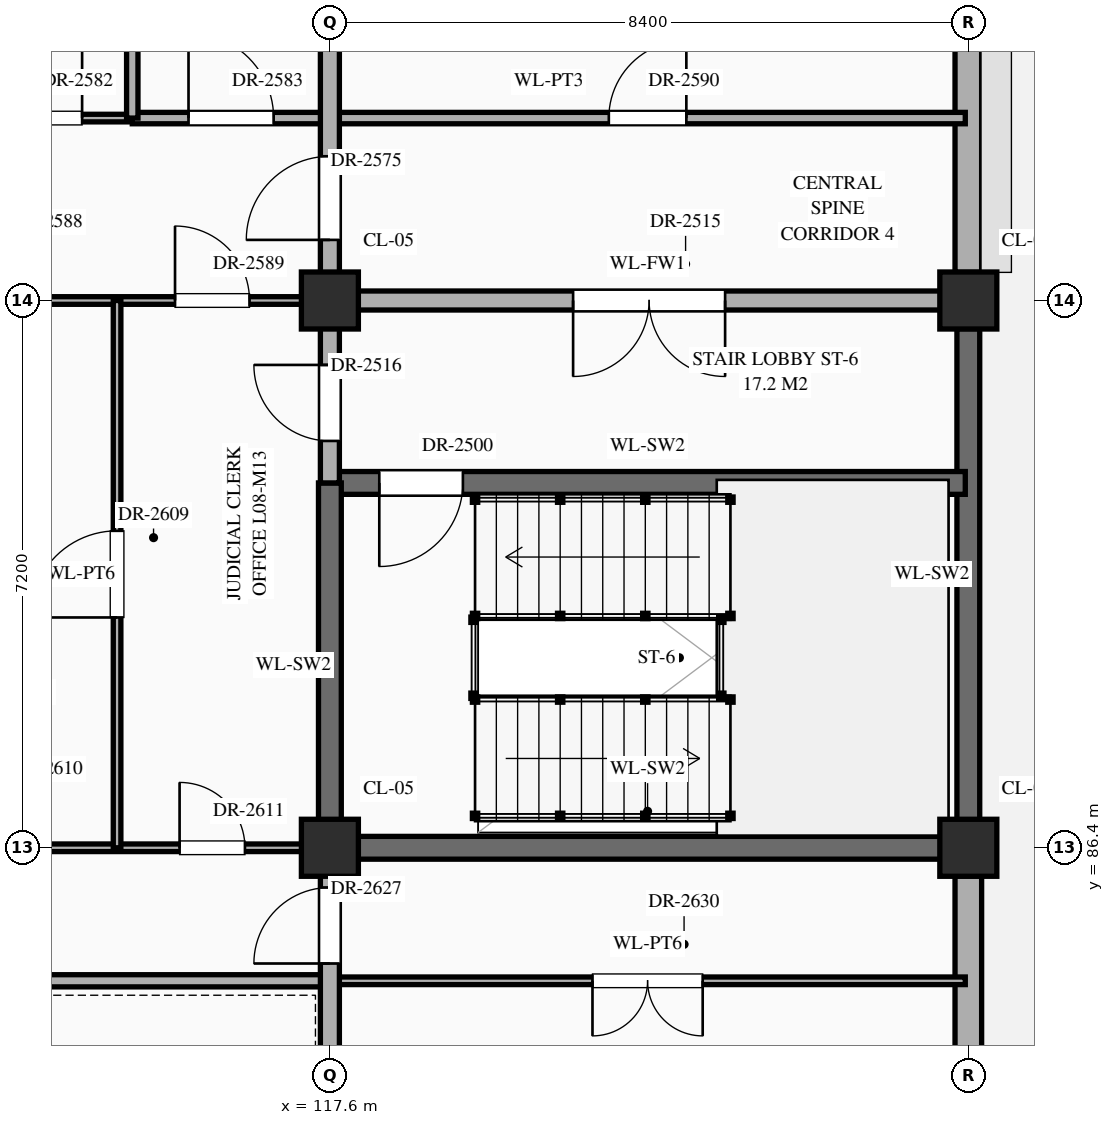
"""IFC4 building model, lengths in metres.
Left out: names, types, materials, properties, quantities, classifications, styles, units other than length and angle.
Written with IfcOpenShell. Run it as: python <this file> out.ifc"""

import sys

from ifc_helpers import new_model, si_unit, direction, frame, frame_2d, origin, origin_2d, place, context, subcontext, project, spatial, rectangle, extrude, element, fill, save


model = new_model("IFC4")
c1 = context("Model", 3, precision=1e-05, world=origin(), true_north=direction((0.0, 1.0)))
c2 = subcontext(c1, "Body", "Model", "MODEL_VIEW")
j1 = project(units=[si_unit("LENGTHUNIT", "METRE"), si_unit("PLANEANGLEUNIT", "RADIAN")], contexts=[c1])
p1 = place(None, origin())
s1 = spatial("IfcSite", under=j1, at=p1, CompositionType="ELEMENT")
p2 = place(p1, origin())
s2 = spatial("IfcBuilding", under=s1, at=p2, CompositionType="ELEMENT")
p3 = place(p2, frame((0.0, 0.0, 35.1)))
s3 = spatial("IfcBuildingStorey", under=s2, at=p3, CompositionType="ELEMENT", Elevation=35.1)
for number, where, z_axis, x_axis in (
    (1, (117.6, 86.4, 0.0), (0.0, 0.0, 1.0), (1.0, 0.0, 0.0)),
    (2, (117.6, 93.6, 0.0), (0.0, 0.0, 1.0), (1.0, 0.0, 0.0)),
    (3, (126.0, 86.4, 0.0), (0.0, 0.0, 1.0), (1.0, 0.0, 0.0)),
    (4, (126.0, 93.6, 0.0), (0.0, 0.0, 1.0), (1.0, 0.0, 0.0)),
):
    element("IfcColumn", number, at=place(p3, frame(where, z_axis=z_axis, x_axis=x_axis)), inside=s3, PredefinedType="COLUMN", context=c2, shape_type="SweptSolid", body=[
        extrude(rectangle(XDim=0.75, YDim=0.75, at=origin_2d()), origin(), (0.0, 0.0, 1.0), 4.2),
    ])
p4 = place(p3, frame((126.0, 79.57, 0.0), z_axis=(0.0, 0.0, 1.0), x_axis=(0.0, 1.0, 0.0)))
e5 = element("IfcWall", 5, at=p4, inside=s3, PredefinedType="STANDARD", context=c2, shape_type="SweptSolid", body=[
    extrude(rectangle(XDim=6.46, YDim=0.35, at=frame_2d((3.23, 0.0))), origin(), (0.0, 0.0, 1.0), 3.3),
])
p5 = place(p4, frame((1.13, 0.0, 0.0)))
e6 = element("IfcOpeningElement", 6, at=p5, cuts=e5, PredefinedType="OPENING", context=c2, shape_type="SweptSolid", body=[
    extrude(rectangle(XDim=1.8, YDim=2.25, at=frame_2d((0.9, 1.125))), frame((0.0, 0.187, 0.0), z_axis=(0.0, -1.0, 0.0), x_axis=(1.0, 0.0, 0.0)), (0.0, 0.0, 1.0), 0.374),
])
p6 = place(p3, frame((126.0, 86.77, 0.0), z_axis=(0.0, 0.0, 1.0), x_axis=(0.0, 1.0, 0.0)))
e7 = element("IfcWall", 7, at=p6, inside=s3, PredefinedType="SHEAR", context=c2, shape_type="SweptSolid", body=[
    extrude(rectangle(XDim=6.46, YDim=0.3, at=frame_2d((3.23, 0.0))), origin(), (0.0, 0.0, 1.0), 3.95),
])
p7 = place(p3, frame((126.0, 93.97, 0.0), z_axis=(0.0, 0.0, 1.0), x_axis=(0.0, 1.0, 0.0)))
e8 = element("IfcWall", 8, at=p7, inside=s3, PredefinedType="STANDARD", context=c2, shape_type="SweptSolid", body=[
    extrude(rectangle(XDim=6.46, YDim=0.35, at=frame_2d((3.23, 0.0))), origin(), (0.0, 0.0, 1.0), 3.3),
])
p8 = place(p7, frame((4.005, 0.0, 0.85)))
e9 = element("IfcOpeningElement", 9, at=p8, cuts=e8, PredefinedType="OPENING", context=c2, shape_type="SweptSolid", body=[
    extrude(rectangle(XDim=1.05, YDim=1.56, at=frame_2d((0.525, 0.78))), frame((0.0, 0.187, 0.0), z_axis=(0.0, -1.0, 0.0), x_axis=(1.0, 0.0, 0.0)), (0.0, 0.0, 1.0), 0.374),
])
p9 = place(p3, frame((100.8, 84.65, 0.0), z_axis=(0.0, 0.0, 1.0), x_axis=(1.0, 0.0, 0.0)))
e10 = element("IfcWall", 10, at=p9, inside=s3, PredefinedType="STANDARD", context=c2, shape_type="SweptSolid", body=[
    extrude(rectangle(XDim=16.8, YDim=0.16, at=frame_2d((8.4, 0.0))), origin(), (0.0, 0.0, 1.0), 3.95),
])
p10 = place(p9, frame((7.55, 0.0, 0.0)))
e11 = element("IfcOpeningElement", 11, at=p10, cuts=e10, PredefinedType="OPENING", context=c2, shape_type="SweptSolid", body=[
    extrude(rectangle(XDim=1.7, YDim=2.45, at=frame_2d((0.85, 1.225))), frame((0.0, 0.092, 0.0), z_axis=(0.0, -1.0, 0.0), x_axis=(1.0, 0.0, 0.0)), (0.0, 0.0, 1.0), 0.184),
])
p11 = place(p3, frame((117.6, 84.65, 0.0), z_axis=(0.0, 0.0, 1.0), x_axis=(1.0, 0.0, 0.0)))
e12 = element("IfcWall", 12, at=p11, inside=s3, PredefinedType="STANDARD", context=c2, shape_type="SweptSolid", body=[
    extrude(rectangle(XDim=8.36, YDim=0.1, at=frame_2d((4.18, 0.0))), origin(), (0.0, 0.0, 1.0), 3.95),
])
p12 = place(p11, frame((3.455, 0.0, 0.0)))
e13 = element("IfcOpeningElement", 13, at=p12, cuts=e12, PredefinedType="OPENING", context=c2, shape_type="SweptSolid", body=[
    extrude(rectangle(XDim=1.45, YDim=2.3, at=frame_2d((0.725, 1.15))), frame((0.0, 0.062, 0.0), z_axis=(0.0, -1.0, 0.0), x_axis=(1.0, 0.0, 0.0)), (0.0, 0.0, 1.0), 0.124),
])
p13 = place(p3, frame((109.2, 86.4, 0.0), z_axis=(0.0, 0.0, 1.0), x_axis=(1.0, 0.0, 0.0)))
e14 = element("IfcWall", 14, at=p13, inside=s3, PredefinedType="STANDARD", context=c2, shape_type="SweptSolid", body=[
    extrude(rectangle(XDim=8.4, YDim=0.1, at=frame_2d((4.2, 0.0))), origin(), (0.0, 0.0, 1.0), 3.1),
])
p14 = place(p13, frame((1.018, 0.0, 0.0)))
e15 = element("IfcOpeningElement", 15, at=p14, cuts=e14, PredefinedType="OPENING", context=c2, shape_type="SweptSolid", body=[
    extrude(rectangle(XDim=1.06, YDim=2.4, at=frame_2d((0.53, 1.2))), frame((0.0, 0.062, 0.0), z_axis=(0.0, -1.0, 0.0), x_axis=(1.0, 0.0, 0.0)), (0.0, 0.0, 1.0), 0.124),
])
p15 = place(p13, frame((3.75, 0.0, 0.0)))
e16 = element("IfcOpeningElement", 16, at=p15, cuts=e14, PredefinedType="OPENING", context=c2, shape_type="SweptSolid", body=[
    extrude(rectangle(XDim=0.9, YDim=2.15, at=frame_2d((0.45, 1.075))), frame((0.0, 0.062, 0.0), z_axis=(0.0, -1.0, 0.0), x_axis=(1.0, 0.0, 0.0)), (0.0, 0.0, 1.0), 0.124),
])
p16 = place(p13, frame((6.423, 0.0, 0.0)))
e17 = element("IfcOpeningElement", 17, at=p16, cuts=e14, PredefinedType="OPENING", context=c2, shape_type="SweptSolid", body=[
    extrude(rectangle(XDim=0.86, YDim=2.1, at=frame_2d((0.43, 1.05))), frame((0.0, 0.062, 0.0), z_axis=(0.0, -1.0, 0.0), x_axis=(1.0, 0.0, 0.0)), (0.0, 0.0, 1.0), 0.124),
])
p17 = place(p3, frame((117.6, 86.4, 0.0), z_axis=(0.0, 0.0, 1.0), x_axis=(1.0, 0.0, 0.0)))
e18 = element("IfcWall", 18, at=p17, inside=s3, PredefinedType="SHEAR", context=c2, shape_type="SweptSolid", body=[
    extrude(rectangle(XDim=8.36, YDim=0.3, at=frame_2d((4.18, 0.0))), origin(), (0.0, 0.0, 1.0), 3.95),
])
p18 = place(p3, frame((117.6, 91.2, 0.0), z_axis=(0.0, 0.0, 1.0), x_axis=(1.0, 0.0, 0.0)))
e19 = element("IfcWall", 19, at=p18, inside=s3, PredefinedType="SHEAR", context=c2, shape_type="SweptSolid", body=[
    extrude(rectangle(XDim=8.36, YDim=0.3, at=frame_2d((4.18, 0.0))), origin(), (0.0, 0.0, 1.0), 3.95),
])
p19 = place(p18, frame((0.65, 0.0, 0.0)))
e20 = element("IfcOpeningElement", 20, at=p19, cuts=e19, PredefinedType="OPENING", context=c2, shape_type="SweptSolid", body=[
    extrude(rectangle(XDim=1.1, YDim=2.2, at=frame_2d((0.55, 1.1))), frame((0.0, 0.162, 0.0), z_axis=(0.0, -1.0, 0.0), x_axis=(1.0, 0.0, 0.0)), (0.0, 0.0, 1.0), 0.324),
])
p20 = place(p3, frame((109.2, 93.6, 0.0), z_axis=(0.0, 0.0, 1.0), x_axis=(1.0, 0.0, 0.0)))
e21 = element("IfcWall", 21, at=p20, inside=s3, PredefinedType="STANDARD", context=c2, shape_type="SweptSolid", body=[
    extrude(rectangle(XDim=8.4, YDim=0.1, at=frame_2d((4.2, 0.0))), origin(), (0.0, 0.0, 1.0), 3.1),
])
p21 = place(p20, frame((0.907, 0.0, 0.0)))
e22 = element("IfcOpeningElement", 22, at=p21, cuts=e21, PredefinedType="OPENING", context=c2, shape_type="SweptSolid", body=[
    extrude(rectangle(XDim=1.28, YDim=2.35, at=frame_2d((0.64, 1.175))), frame((0.0, 0.062, 0.0), z_axis=(0.0, -1.0, 0.0), x_axis=(1.0, 0.0, 0.0)), (0.0, 0.0, 1.0), 0.124),
])
p22 = place(p20, frame((3.73, 0.0, 0.0)))
e23 = element("IfcOpeningElement", 23, at=p22, cuts=e21, PredefinedType="OPENING", context=c2, shape_type="SweptSolid", body=[
    extrude(rectangle(XDim=0.94, YDim=2.3, at=frame_2d((0.47, 1.15))), frame((0.0, 0.062, 0.0), z_axis=(0.0, -1.0, 0.0), x_axis=(1.0, 0.0, 0.0)), (0.0, 0.0, 1.0), 0.124),
])
p23 = place(p20, frame((6.363, 0.0, 0.0)))
e24 = element("IfcOpeningElement", 24, at=p23, cuts=e21, PredefinedType="OPENING", context=c2, shape_type="SweptSolid", body=[
    extrude(rectangle(XDim=0.98, YDim=2.35, at=frame_2d((0.49, 1.175))), frame((0.0, 0.062, 0.0), z_axis=(0.0, -1.0, 0.0), x_axis=(1.0, 0.0, 0.0)), (0.0, 0.0, 1.0), 0.124),
])
p24 = place(p3, frame((117.6, 93.6, 0.0), z_axis=(0.0, 0.0, 1.0), x_axis=(1.0, 0.0, 0.0)))
e25 = element("IfcWall", 25, at=p24, inside=s3, PredefinedType="STANDARD", context=c2, shape_type="SweptSolid", body=[
    extrude(rectangle(XDim=8.36, YDim=0.25, at=frame_2d((4.18, 0.0))), origin(), (0.0, 0.0, 1.0), 3.1),
])
p25 = place(p24, frame((3.2, 0.0, 0.0)))
e26 = element("IfcOpeningElement", 26, at=p25, cuts=e25, PredefinedType="OPENING", context=c2, shape_type="SweptSolid", body=[
    extrude(rectangle(XDim=2.0, YDim=2.4, at=frame_2d((1.0, 1.2))), frame((0.0, 0.137, 0.0), z_axis=(0.0, -1.0, 0.0), x_axis=(1.0, 0.0, 0.0)), (0.0, 0.0, 1.0), 0.274),
])
p26 = place(p3, frame((109.2, 96.0, 0.0), z_axis=(0.0, 0.0, 1.0), x_axis=(1.0, 0.0, 0.0)))
e27 = element("IfcWall", 27, at=p26, inside=s3, PredefinedType="STANDARD", context=c2, shape_type="SweptSolid", body=[
    extrude(rectangle(XDim=5.8, YDim=0.1, at=frame_2d((2.9, 0.0))), origin(), (0.0, 0.0, 1.0), 3.95),
])
p27 = place(p26, frame((1.18, 0.0, 0.0)))
e28 = element("IfcOpeningElement", 28, at=p27, cuts=e27, PredefinedType="OPENING", context=c2, shape_type="SweptSolid", body=[
    extrude(rectangle(XDim=1.04, YDim=2.2, at=frame_2d((0.52, 1.1))), frame((0.0, 0.062, 0.0), z_axis=(0.0, -1.0, 0.0), x_axis=(1.0, 0.0, 0.0)), (0.0, 0.0, 1.0), 0.124),
])
p28 = place(p26, frame((4.06, 0.0, 0.0)))
e29 = element("IfcOpeningElement", 29, at=p28, cuts=e27, PredefinedType="OPENING", context=c2, shape_type="SweptSolid", body=[
    extrude(rectangle(XDim=1.08, YDim=2.25, at=frame_2d((0.54, 1.125))), frame((0.0, 0.062, 0.0), z_axis=(0.0, -1.0, 0.0), x_axis=(1.0, 0.0, 0.0)), (0.0, 0.0, 1.0), 0.124),
])
p29 = place(p3, frame((115.0, 96.0, 0.0), z_axis=(0.0, 0.0, 1.0), x_axis=(1.0, 0.0, 0.0)))
e30 = element("IfcWall", 30, at=p29, inside=s3, PredefinedType="STANDARD", context=c2, shape_type="SweptSolid", body=[
    extrude(rectangle(XDim=10.96, YDim=0.15, at=frame_2d((5.48, 0.0))), origin(), (0.0, 0.0, 1.0), 3.95),
])
p30 = place(p29, frame((0.74, 0.0, 0.0)))
e31 = element("IfcOpeningElement", 31, at=p30, cuts=e30, PredefinedType="OPENING", context=c2, shape_type="SweptSolid", body=[
    extrude(rectangle(XDim=1.12, YDim=2.25, at=frame_2d((0.56, 1.125))), frame((0.0, 0.087, 0.0), z_axis=(0.0, -1.0, 0.0), x_axis=(1.0, 0.0, 0.0)), (0.0, 0.0, 1.0), 0.174),
])
p31 = place(p29, frame((6.27, 0.0, 0.0)))
e32 = element("IfcOpeningElement", 32, at=p31, cuts=e30, PredefinedType="OPENING", context=c2, shape_type="SweptSolid", body=[
    extrude(rectangle(XDim=1.02, YDim=2.4, at=frame_2d((0.51, 1.2))), frame((0.0, 0.087, 0.0), z_axis=(0.0, -1.0, 0.0), x_axis=(1.0, 0.0, 0.0)), (0.0, 0.0, 1.0), 0.174),
])
p32 = place(p3, frame((114.8, 86.4, 0.0), z_axis=(0.0, 0.0, 1.0), x_axis=(0.0, 1.0, 0.0)))
e33 = element("IfcWall", 33, at=p32, inside=s3, PredefinedType="STANDARD", context=c2, shape_type="SweptSolid", body=[
    extrude(rectangle(XDim=7.2, YDim=0.1, at=frame_2d((3.6, 0.0))), origin(), (0.0, 0.0, 1.0), 3.95),
])
p33 = place(p32, frame((3.03, 0.0, 0.0)))
e34 = element("IfcOpeningElement", 34, at=p33, cuts=e33, PredefinedType="OPENING", context=c2, shape_type="SweptSolid", body=[
    extrude(rectangle(XDim=1.14, YDim=2.4, at=frame_2d((0.57, 1.2))), frame((0.0, 0.062, 0.0), z_axis=(0.0, -1.0, 0.0), x_axis=(1.0, 0.0, 0.0)), (0.0, 0.0, 1.0), 0.124),
])
p34 = place(p3, frame((115.0, 96.0, 0.0), z_axis=(0.0, 0.0, 1.0), x_axis=(0.0, 1.0, 0.0)))
e35 = element("IfcWall", 35, at=p34, inside=s3, PredefinedType="STANDARD", context=c2, shape_type="SweptSolid", body=[
    extrude(rectangle(XDim=4.8, YDim=0.15, at=frame_2d((2.4, 0.0))), origin(), (0.0, 0.0, 1.0), 3.95),
])
p35 = place(p34, frame((1.92, 0.0, 0.0)))
e36 = element("IfcOpeningElement", 36, at=p35, cuts=e35, PredefinedType="OPENING", context=c2, shape_type="SweptSolid", body=[
    extrude(rectangle(XDim=0.96, YDim=2.2, at=frame_2d((0.48, 1.1))), frame((0.0, 0.087, 0.0), z_axis=(0.0, -1.0, 0.0), x_axis=(1.0, 0.0, 0.0)), (0.0, 0.0, 1.0), 0.174),
])
p36 = place(p3, frame((117.6, 79.24, 0.0), z_axis=(0.0, 0.0, 1.0), x_axis=(0.0, 1.0, 0.0)))
e37 = element("IfcWall", 37, at=p36, inside=s3, PredefinedType="STANDARD", context=c2, shape_type="SweptSolid", body=[
    extrude(rectangle(XDim=7.16, YDim=0.25, at=frame_2d((3.58, 0.0))), origin(), (0.0, 0.0, 1.0), 3.2),
])
p37 = place(p36, frame((5.637, 0.0, 0.0)))
e38 = element("IfcOpeningElement", 38, at=p37, cuts=e37, PredefinedType="OPENING", context=c2, shape_type="SweptSolid", body=[
    extrude(rectangle(XDim=1.0, YDim=2.2, at=frame_2d((0.5, 1.1))), frame((0.0, 0.137, 0.0), z_axis=(0.0, -1.0, 0.0), x_axis=(1.0, 0.0, 0.0)), (0.0, 0.0, 1.0), 0.274),
])
p38 = place(p36, frame((2.032, 0.0, 0.0)))
e39 = element("IfcOpeningElement", 39, at=p38, cuts=e37, PredefinedType="OPENING", context=c2, shape_type="SweptSolid", body=[
    extrude(rectangle(XDim=1.6, YDim=2.3, at=frame_2d((0.8, 1.15))), frame((0.0, 0.137, 0.0), z_axis=(0.0, -1.0, 0.0), x_axis=(1.0, 0.0, 0.0)), (0.0, 0.0, 1.0), 0.274),
])
p39 = place(p3, frame((117.6, 86.4, 0.0), z_axis=(0.0, 0.0, 1.0), x_axis=(0.0, 1.0, 0.0)))
e40 = element("IfcWall", 40, at=p39, inside=s3, PredefinedType="SHEAR", context=c2, shape_type="SweptSolid", body=[
    extrude(rectangle(XDim=4.8, YDim=0.3, at=frame_2d((2.4, 0.0))), origin(), (0.0, 0.0, 1.0), 3.95),
])
p40 = place(p3, frame((117.6, 91.2, 0.0), z_axis=(0.0, 0.0, 1.0), x_axis=(0.0, 1.0, 0.0)))
e41 = element("IfcWall", 41, at=p40, inside=s3, PredefinedType="STANDARD", context=c2, shape_type="SweptSolid", body=[
    extrude(rectangle(XDim=13.2, YDim=0.25, at=frame_2d((6.6, 0.0))), origin(), (0.0, 0.0, 1.0), 3.2),
])
p41 = place(p40, frame((0.552, 0.0, 0.0)))
e42 = element("IfcOpeningElement", 42, at=p41, cuts=e41, PredefinedType="OPENING", context=c2, shape_type="SweptSolid", body=[
    extrude(rectangle(XDim=1.0, YDim=2.2, at=frame_2d((0.5, 1.1))), frame((0.0, 0.137, 0.0), z_axis=(0.0, -1.0, 0.0), x_axis=(1.0, 0.0, 0.0)), (0.0, 0.0, 1.0), 0.274),
])
p42 = place(p40, frame((10.397, 0.0, 0.0)))
e43 = element("IfcOpeningElement", 43, at=p42, cuts=e41, PredefinedType="OPENING", context=c2, shape_type="SweptSolid", body=[
    extrude(rectangle(XDim=1.1, YDim=2.2, at=frame_2d((0.55, 1.1))), frame((0.0, 0.137, 0.0), z_axis=(0.0, -1.0, 0.0), x_axis=(1.0, 0.0, 0.0)), (0.0, 0.0, 1.0), 0.274),
])
p43 = place(p40, frame((3.198, 0.0, 0.0)))
e44 = element("IfcOpeningElement", 44, at=p43, cuts=e41, PredefinedType="OPENING", context=c2, shape_type="SweptSolid", body=[
    extrude(rectangle(XDim=1.1, YDim=2.2, at=frame_2d((0.55, 1.1))), frame((0.0, 0.137, 0.0), z_axis=(0.0, -1.0, 0.0), x_axis=(1.0, 0.0, 0.0)), (0.0, 0.0, 1.0), 0.274),
])
p44 = place(p19, frame((1.1, 0.0, 0.0), z_axis=(0.0, 0.0, 1.0), x_axis=(-1.0, 0.0, 0.0)))
e45 = element("IfcDoor", 45, at=p44, inside=s3, OperationType="SINGLE_SWING_RIGHT", PredefinedType="DOOR", context=c2, shape_type="SweptSolid", body=[
    extrude(rectangle(XDim=1.1, YDim=2.2, at=frame_2d((0.55, 1.1))), frame((0.0, 0.025, 0.0), z_axis=(0.0, -1.0, 0.0), x_axis=(1.0, 0.0, 0.0)), (0.0, 0.0, 1.0), 0.05),
])
fill(e20, e45)
p45 = place(p25, frame((2.0, 0.0, 0.0), z_axis=(0.0, 0.0, 1.0), x_axis=(-1.0, 0.0, 0.0)))
e46 = element("IfcDoor", 46, at=p45, inside=s3, OperationType="DOUBLE_DOOR_SINGLE_SWING", PredefinedType="DOOR", context=c2, shape_type="SweptSolid", body=[
    extrude(rectangle(XDim=2.0, YDim=2.4, at=frame_2d((1.0, 1.2))), frame((0.0, 0.025, 0.0), z_axis=(0.0, -1.0, 0.0), x_axis=(1.0, 0.0, 0.0)), (0.0, 0.0, 1.0), 0.05),
])
fill(e26, e46)
p46 = place(p41, origin())
e47 = element("IfcDoor", 47, at=p46, inside=s3, OperationType="SINGLE_SWING_RIGHT", PredefinedType="DOOR", context=c2, shape_type="SweptSolid", body=[
    extrude(rectangle(XDim=1.0, YDim=2.2, at=frame_2d((0.5, 1.1))), frame((0.0, 0.025, 0.0), z_axis=(0.0, -1.0, 0.0), x_axis=(1.0, 0.0, 0.0)), (0.0, 0.0, 1.0), 0.05),
])
fill(e42, e47)
p47 = place(p43, origin())
e48 = element("IfcDoor", 48, at=p47, inside=s3, OperationType="SINGLE_SWING_LEFT", PredefinedType="DOOR", context=c2, shape_type="SweptSolid", body=[
    extrude(rectangle(XDim=1.1, YDim=2.2, at=frame_2d((0.55, 1.1))), frame((0.0, 0.025, 0.0), z_axis=(0.0, -1.0, 0.0), x_axis=(1.0, 0.0, 0.0)), (0.0, 0.0, 1.0), 0.05),
])
fill(e44, e48)
p48 = place(p28, origin())
e49 = element("IfcDoor", 49, at=p48, inside=s3, OperationType="SINGLE_SWING_RIGHT", PredefinedType="DOOR", context=c2, shape_type="SweptSolid", body=[
    extrude(rectangle(XDim=1.08, YDim=2.25, at=frame_2d((0.54, 1.125))), frame((0.0, 0.025, 0.0), z_axis=(0.0, -1.0, 0.0), x_axis=(1.0, 0.0, 0.0)), (0.0, 0.0, 1.0), 0.05),
])
fill(e29, e49)
p49 = place(p30, origin())
e50 = element("IfcDoor", 50, at=p49, inside=s3, OperationType="SINGLE_SWING_LEFT", PredefinedType="DOOR", context=c2, shape_type="SweptSolid", body=[
    extrude(rectangle(XDim=1.12, YDim=2.25, at=frame_2d((0.56, 1.125))), frame((0.0, 0.025, 0.0), z_axis=(0.0, -1.0, 0.0), x_axis=(1.0, 0.0, 0.0)), (0.0, 0.0, 1.0), 0.05),
])
fill(e31, e50)
p50 = place(p23, origin())
e51 = element("IfcDoor", 51, at=p50, inside=s3, OperationType="SINGLE_SWING_LEFT", PredefinedType="DOOR", context=c2, shape_type="SweptSolid", body=[
    extrude(rectangle(XDim=0.98, YDim=2.35, at=frame_2d((0.49, 1.175))), frame((0.0, 0.025, 0.0), z_axis=(0.0, -1.0, 0.0), x_axis=(1.0, 0.0, 0.0)), (0.0, 0.0, 1.0), 0.05),
])
fill(e24, e51)
p51 = place(p31, origin())
e52 = element("IfcDoor", 52, at=p51, inside=s3, OperationType="SINGLE_SWING_RIGHT", PredefinedType="DOOR", context=c2, shape_type="SweptSolid", body=[
    extrude(rectangle(XDim=1.02, YDim=2.4, at=frame_2d((0.51, 1.2))), frame((0.0, 0.025, 0.0), z_axis=(0.0, -1.0, 0.0), x_axis=(1.0, 0.0, 0.0)), (0.0, 0.0, 1.0), 0.05),
])
fill(e32, e52)
p52 = place(p33, origin())
e53 = element("IfcDoor", 53, at=p52, inside=s3, OperationType="SINGLE_SWING_LEFT", PredefinedType="DOOR", context=c2, shape_type="SweptSolid", body=[
    extrude(rectangle(XDim=1.14, YDim=2.4, at=frame_2d((0.57, 1.2))), frame((0.0, 0.025, 0.0), z_axis=(0.0, -1.0, 0.0), x_axis=(1.0, 0.0, 0.0)), (0.0, 0.0, 1.0), 0.05),
])
fill(e34, e53)
p53 = place(p16, origin())
e54 = element("IfcDoor", 54, at=p53, inside=s3, OperationType="SINGLE_SWING_LEFT", PredefinedType="DOOR", context=c2, shape_type="SweptSolid", body=[
    extrude(rectangle(XDim=0.86, YDim=2.1, at=frame_2d((0.43, 1.05))), frame((0.0, 0.025, 0.0), z_axis=(0.0, -1.0, 0.0), x_axis=(1.0, 0.0, 0.0)), (0.0, 0.0, 1.0), 0.05),
])
fill(e17, e54)
p54 = place(p37, origin())
e55 = element("IfcDoor", 55, at=p54, inside=s3, OperationType="SINGLE_SWING_LEFT", PredefinedType="DOOR", context=c2, shape_type="SweptSolid", body=[
    extrude(rectangle(XDim=1.0, YDim=2.2, at=frame_2d((0.5, 1.1))), frame((0.0, 0.025, 0.0), z_axis=(0.0, -1.0, 0.0), x_axis=(1.0, 0.0, 0.0)), (0.0, 0.0, 1.0), 0.05),
])
fill(e38, e55)
p55 = place(p12, frame((1.45, 0.0, 0.0), z_axis=(0.0, 0.0, 1.0), x_axis=(-1.0, 0.0, 0.0)))
e56 = element("IfcDoor", 56, at=p55, inside=s3, OperationType="DOUBLE_DOOR_SINGLE_SWING", PredefinedType="DOOR", context=c2, shape_type="SweptSolid", body=[
    extrude(rectangle(XDim=1.45, YDim=2.3, at=frame_2d((0.725, 1.15))), frame((0.0, 0.025, 0.0), z_axis=(0.0, -1.0, 0.0), x_axis=(1.0, 0.0, 0.0)), (0.0, 0.0, 1.0), 0.05),
])
fill(e13, e56)
save(model, sys.argv[1])
